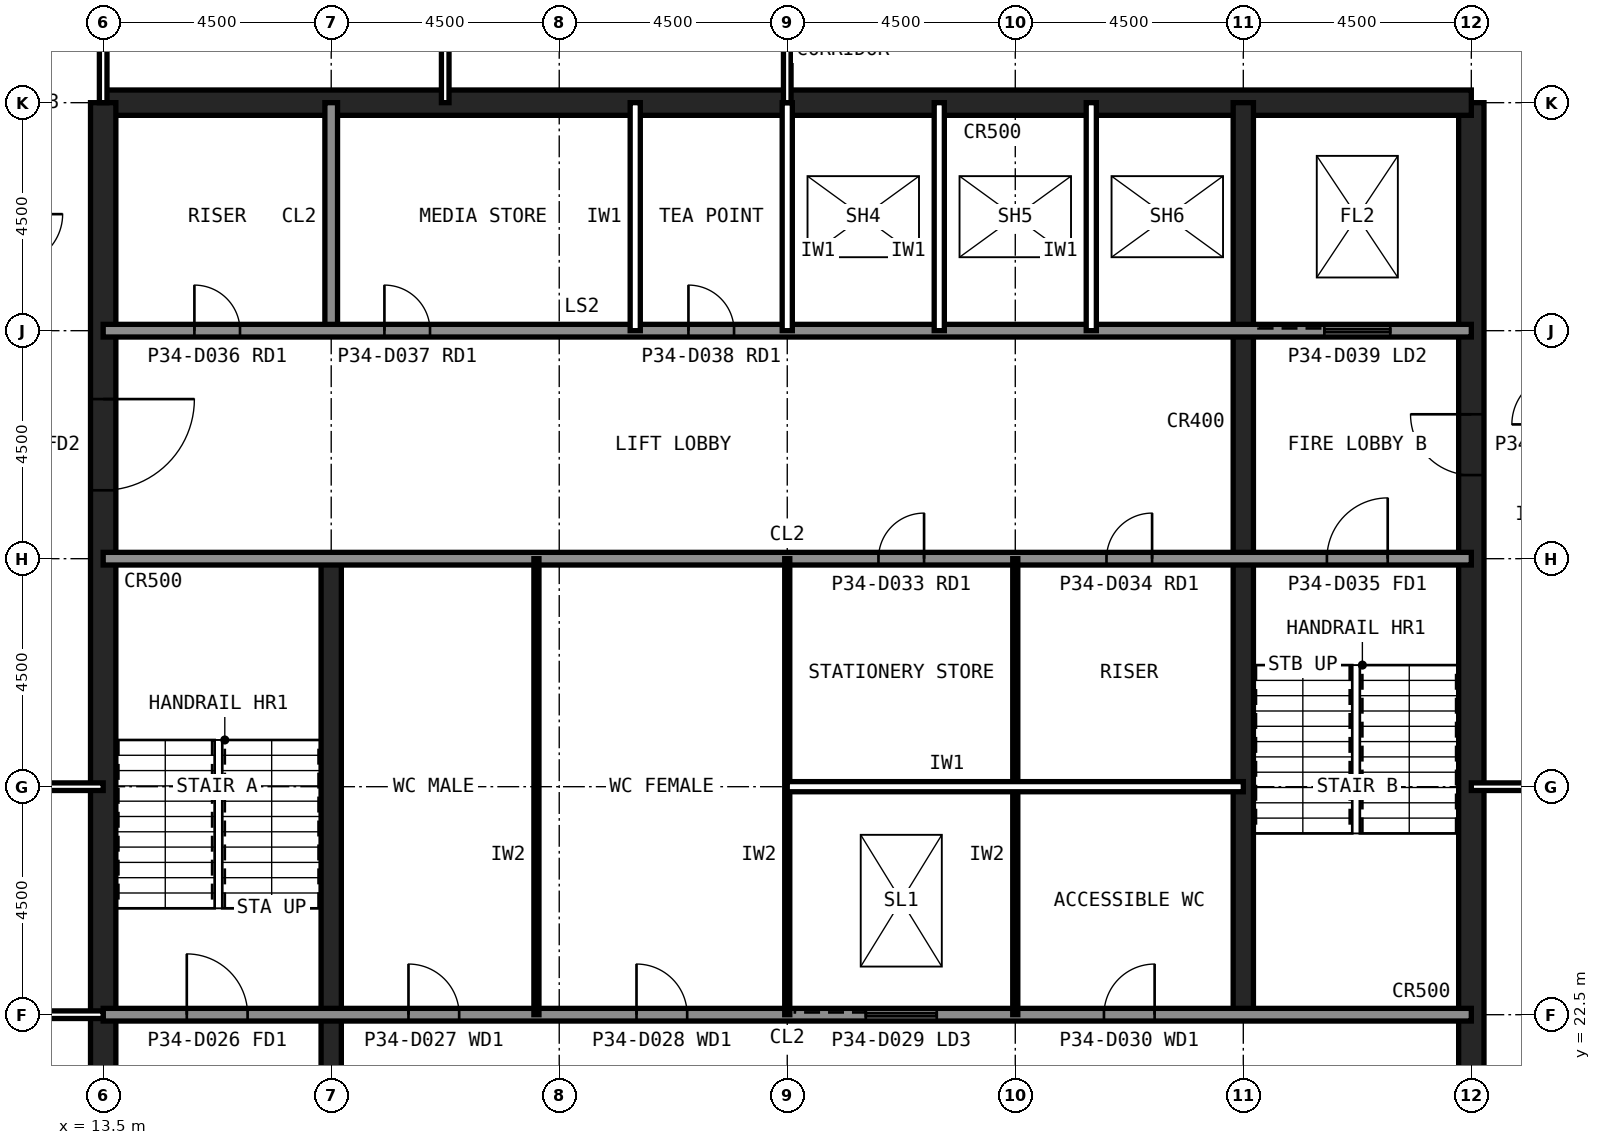
"""IFC4 building model, lengths in metres.
Left out: names, types, materials, properties, quantities, classifications, styles, units other than length and angle.
Written with IfcOpenShell. Run it as: python <this file> out.ifc"""

import sys

from ifc_helpers import new_model, si_unit, direction, frame, frame_2d, origin, place, context, subcontext, project, spatial, rectangle, extrude, element, fill, save


model = new_model("IFC4")
c1 = context("Model", 3, precision=1e-05, world=origin(), true_north=direction((0.0, 1.0)))
c2 = subcontext(c1, "Body", "Model", "MODEL_VIEW")
j1 = project(units=[si_unit("LENGTHUNIT", "METRE"), si_unit("PLANEANGLEUNIT", "RADIAN")], contexts=[c1])
p1 = place(None, origin())
s1 = spatial("IfcSite", under=j1, at=p1, CompositionType="ELEMENT")
p2 = place(p1, origin())
s2 = spatial("IfcBuilding", under=s1, at=p2, CompositionType="ELEMENT")
p3 = place(p2, frame((0.0, 0.0, 143.6)))
s3 = spatial("IfcBuildingStorey", under=s2, at=p3, CompositionType="ELEMENT", Elevation=143.6)
p4 = place(p3, frame((40.5, 13.5, 0.0), z_axis=(0.0, 0.0, 1.0), x_axis=(0.0, 1.0, 0.0)))
e1 = element("IfcWall", 1, at=p4, inside=s3, PredefinedType="SHEAR", context=c2, shape_type="SweptSolid", body=[
    extrude(rectangle(XDim=27.0, YDim=0.5, at=frame_2d((13.5, 0.0))), origin(), (0.0, 0.0, 1.0), 4.0),
])
p5 = place(p4, frame((5.85, 0.0, 0.0)))
e2 = element("IfcOpeningElement", 2, at=p5, cuts=e1, PredefinedType="OPENING", context=c2, shape_type="SweptSolid", body=[
    extrude(rectangle(XDim=1.8, YDim=2.1, at=frame_2d((0.9, 1.05))), frame((0.0, 0.26, 0.0), z_axis=(0.0, -1.0, 0.0), x_axis=(1.0, 0.0, 0.0)), (0.0, 0.0, 1.0), 0.52),
])
p6 = place(p4, frame((19.65, 0.0, 0.0)))
e3 = element("IfcOpeningElement", 3, at=p6, cuts=e1, PredefinedType="OPENING", context=c2, shape_type="SweptSolid", body=[
    extrude(rectangle(XDim=1.2, YDim=2.1, at=frame_2d((0.6, 1.05))), frame((0.0, 0.26, 0.0), z_axis=(0.0, -1.0, 0.0), x_axis=(1.0, 0.0, 0.0)), (0.0, 0.0, 1.0), 0.52),
])
p7 = place(p3, frame((40.5, 40.5, 0.0), z_axis=(0.0, 0.0, 1.0), x_axis=(-1.0, 0.0, 0.0)))
e4 = element("IfcWall", 4, at=p7, inside=s3, PredefinedType="SHEAR", context=c2, shape_type="SweptSolid", body=[
    extrude(rectangle(XDim=27.0, YDim=0.5, at=frame_2d((13.5, 0.0))), origin(), (0.0, 0.0, 1.0), 4.0),
])
p8 = place(p3, frame((13.5, 40.5, 0.0), z_axis=(0.0, 0.0, 1.0), x_axis=(0.0, -1.0, 0.0)))
e5 = element("IfcWall", 5, at=p8, inside=s3, PredefinedType="SHEAR", context=c2, shape_type="SweptSolid", body=[
    extrude(rectangle(XDim=27.0, YDim=0.5, at=frame_2d((13.5, 0.0))), origin(), (0.0, 0.0, 1.0), 4.0),
])
p9 = place(p8, frame((19.65, 0.0, 0.0)))
e6 = element("IfcOpeningElement", 6, at=p9, cuts=e5, PredefinedType="OPENING", context=c2, shape_type="SweptSolid", body=[
    extrude(rectangle(XDim=1.2, YDim=2.1, at=frame_2d((0.6, 1.05))), frame((0.0, 0.26, 0.0), z_axis=(0.0, -1.0, 0.0), x_axis=(1.0, 0.0, 0.0)), (0.0, 0.0, 1.0), 0.52),
])
p10 = place(p8, frame((5.85, 0.0, 0.0)))
e7 = element("IfcOpeningElement", 7, at=p10, cuts=e5, PredefinedType="OPENING", context=c2, shape_type="SweptSolid", body=[
    extrude(rectangle(XDim=1.8, YDim=2.1, at=frame_2d((0.9, 1.05))), frame((0.0, 0.26, 0.0), z_axis=(0.0, -1.0, 0.0), x_axis=(1.0, 0.0, 0.0)), (0.0, 0.0, 1.0), 0.52),
])
p11 = place(p3, frame((18.0, 13.5, 0.0), z_axis=(0.0, 0.0, 1.0), x_axis=(0.0, 1.0, 0.0)))
e8 = element("IfcWall", 8, at=p11, inside=s3, PredefinedType="SHEAR", context=c2, shape_type="SweptSolid", body=[
    extrude(rectangle(XDim=18.0, YDim=0.4, at=frame_2d((9.0, 0.0))), origin(), (0.0, 0.0, 1.0), 4.0),
])
p12 = place(p3, frame((18.0, 36.0, 0.0), z_axis=(0.0, 0.0, 1.0), x_axis=(0.0, 1.0, 0.0)))
e9 = element("IfcWall", 9, at=p12, inside=s3, PredefinedType="SOLIDWALL", context=c2, shape_type="SweptSolid", body=[
    extrude(rectangle(XDim=4.5, YDim=0.25, at=frame_2d((2.25, 0.0))), origin(), (0.0, 0.0, 1.0), 3.84),
])
p13 = place(p3, frame((36.0, 22.5, 0.0), z_axis=(0.0, 0.0, 1.0), x_axis=(0.0, 1.0, 0.0)))
e10 = element("IfcWall", 10, at=p13, inside=s3, PredefinedType="SHEAR", context=c2, shape_type="SweptSolid", body=[
    extrude(rectangle(XDim=18.0, YDim=0.4, at=frame_2d((9.0, 0.0))), origin(), (0.0, 0.0, 1.0), 4.0),
])
p14 = place(p3, frame((13.5, 36.0, 0.0), z_axis=(0.0, 0.0, 1.0), x_axis=(1.0, 0.0, 0.0)))
e11 = element("IfcWall", 11, at=p14, inside=s3, PredefinedType="SOLIDWALL", context=c2, shape_type="SweptSolid", body=[
    extrude(rectangle(XDim=27.0, YDim=0.25, at=frame_2d((13.5, 0.0))), origin(), (0.0, 0.0, 1.0), 3.84),
])
p15 = place(p14, frame((1.8, 0.0, 0.0)))
e12 = element("IfcOpeningElement", 12, at=p15, cuts=e11, PredefinedType="OPENING", context=c2, shape_type="SweptSolid", body=[
    extrude(rectangle(XDim=0.9, YDim=2.1, at=frame_2d((0.45, 1.05))), frame((0.0, 0.135, 0.0), z_axis=(0.0, -1.0, 0.0), x_axis=(1.0, 0.0, 0.0)), (0.0, 0.0, 1.0), 0.27),
])
p16 = place(p14, frame((5.55, 0.0, 0.0)))
e13 = element("IfcOpeningElement", 13, at=p16, cuts=e11, PredefinedType="OPENING", context=c2, shape_type="SweptSolid", body=[
    extrude(rectangle(XDim=0.9, YDim=2.1, at=frame_2d((0.45, 1.05))), frame((0.0, 0.135, 0.0), z_axis=(0.0, -1.0, 0.0), x_axis=(1.0, 0.0, 0.0)), (0.0, 0.0, 1.0), 0.27),
])
p17 = place(p14, frame((8.55, 0.0, 0.0)))
e14 = element("IfcOpeningElement", 14, at=p17, cuts=e11, PredefinedType="OPENING", context=c2, shape_type="SweptSolid", body=[
    extrude(rectangle(XDim=0.9, YDim=2.1, at=frame_2d((0.45, 1.05))), frame((0.0, 0.135, 0.0), z_axis=(0.0, -1.0, 0.0), x_axis=(1.0, 0.0, 0.0)), (0.0, 0.0, 1.0), 0.27),
])
p18 = place(p14, frame((11.55, 0.0, 0.0)))
e15 = element("IfcOpeningElement", 15, at=p18, cuts=e11, PredefinedType="OPENING", context=c2, shape_type="SweptSolid", body=[
    extrude(rectangle(XDim=0.9, YDim=2.1, at=frame_2d((0.45, 1.05))), frame((0.0, 0.135, 0.0), z_axis=(0.0, -1.0, 0.0), x_axis=(1.0, 0.0, 0.0)), (0.0, 0.0, 1.0), 0.27),
])
p19 = place(p14, frame((24.1, 0.0, 0.0)))
e16 = element("IfcOpeningElement", 16, at=p19, cuts=e11, PredefinedType="OPENING", context=c2, shape_type="SweptSolid", body=[
    extrude(rectangle(XDim=1.3, YDim=2.2, at=frame_2d((0.65, 1.1))), frame((0.0, 0.135, 0.0), z_axis=(0.0, -1.0, 0.0), x_axis=(1.0, 0.0, 0.0)), (0.0, 0.0, 1.0), 0.27),
])
p20 = place(p3, frame((13.5, 22.5, 0.0), z_axis=(0.0, 0.0, 1.0), x_axis=(1.0, 0.0, 0.0)))
e17 = element("IfcWall", 17, at=p20, inside=s3, PredefinedType="SOLIDWALL", context=c2, shape_type="SweptSolid", body=[
    extrude(rectangle(XDim=27.0, YDim=0.25, at=frame_2d((13.5, 0.0))), origin(), (0.0, 0.0, 1.0), 3.84),
])
p21 = place(p20, frame((1.65, 0.0, 0.0)))
e18 = element("IfcOpeningElement", 18, at=p21, cuts=e17, PredefinedType="OPENING", context=c2, shape_type="SweptSolid", body=[
    extrude(rectangle(XDim=1.2, YDim=2.1, at=frame_2d((0.6, 1.05))), frame((0.0, 0.135, 0.0), z_axis=(0.0, -1.0, 0.0), x_axis=(1.0, 0.0, 0.0)), (0.0, 0.0, 1.0), 0.27),
])
p22 = place(p20, frame((6.025, 0.0, 0.0)))
e19 = element("IfcOpeningElement", 19, at=p22, cuts=e17, PredefinedType="OPENING", context=c2, shape_type="SweptSolid", body=[
    extrude(rectangle(XDim=1.0, YDim=2.1, at=frame_2d((0.5, 1.05))), frame((0.0, 0.135, 0.0), z_axis=(0.0, -1.0, 0.0), x_axis=(1.0, 0.0, 0.0)), (0.0, 0.0, 1.0), 0.27),
])
p23 = place(p20, frame((10.525, 0.0, 0.0)))
e20 = element("IfcOpeningElement", 20, at=p23, cuts=e17, PredefinedType="OPENING", context=c2, shape_type="SweptSolid", body=[
    extrude(rectangle(XDim=1.0, YDim=2.1, at=frame_2d((0.5, 1.05))), frame((0.0, 0.135, 0.0), z_axis=(0.0, -1.0, 0.0), x_axis=(1.0, 0.0, 0.0)), (0.0, 0.0, 1.0), 0.27),
])
p24 = place(p20, frame((19.75, 0.0, 0.0)))
e21 = element("IfcOpeningElement", 21, at=p24, cuts=e17, PredefinedType="OPENING", context=c2, shape_type="SweptSolid", body=[
    extrude(rectangle(XDim=1.0, YDim=2.1, at=frame_2d((0.5, 1.05))), frame((0.0, 0.135, 0.0), z_axis=(0.0, -1.0, 0.0), x_axis=(1.0, 0.0, 0.0)), (0.0, 0.0, 1.0), 0.27),
])
p25 = place(p20, frame((15.05, 0.0, 0.0)))
e22 = element("IfcOpeningElement", 22, at=p25, cuts=e17, PredefinedType="OPENING", context=c2, shape_type="SweptSolid", body=[
    extrude(rectangle(XDim=1.4, YDim=2.4, at=frame_2d((0.7, 1.2))), frame((0.0, 0.135, 0.0), z_axis=(0.0, -1.0, 0.0), x_axis=(1.0, 0.0, 0.0)), (0.0, 0.0, 1.0), 0.27),
])
p26 = place(p3, frame((13.5, 31.5, 0.0), z_axis=(0.0, 0.0, 1.0), x_axis=(1.0, 0.0, 0.0)))
e23 = element("IfcWall", 23, at=p26, inside=s3, PredefinedType="SOLIDWALL", context=c2, shape_type="SweptSolid", body=[
    extrude(rectangle(XDim=27.0, YDim=0.25, at=frame_2d((13.5, 0.0))), origin(), (0.0, 0.0, 1.0), 3.84),
])
p27 = place(p26, frame((24.15, 0.0, 0.0)))
e24 = element("IfcOpeningElement", 24, at=p27, cuts=e23, PredefinedType="OPENING", context=c2, shape_type="SweptSolid", body=[
    extrude(rectangle(XDim=1.2, YDim=2.1, at=frame_2d((0.6, 1.05))), frame((0.0, 0.135, 0.0), z_axis=(0.0, -1.0, 0.0), x_axis=(1.0, 0.0, 0.0)), (0.0, 0.0, 1.0), 0.27),
])
p28 = place(p26, frame((15.3, 0.0, 0.0)))
e25 = element("IfcOpeningElement", 25, at=p28, cuts=e23, PredefinedType="OPENING", context=c2, shape_type="SweptSolid", body=[
    extrude(rectangle(XDim=0.9, YDim=2.1, at=frame_2d((0.45, 1.05))), frame((0.0, 0.135, 0.0), z_axis=(0.0, -1.0, 0.0), x_axis=(1.0, 0.0, 0.0)), (0.0, 0.0, 1.0), 0.27),
])
p29 = place(p26, frame((19.8, 0.0, 0.0)))
e26 = element("IfcOpeningElement", 26, at=p29, cuts=e23, PredefinedType="OPENING", context=c2, shape_type="SweptSolid", body=[
    extrude(rectangle(XDim=0.9, YDim=2.1, at=frame_2d((0.45, 1.05))), frame((0.0, 0.135, 0.0), z_axis=(0.0, -1.0, 0.0), x_axis=(1.0, 0.0, 0.0)), (0.0, 0.0, 1.0), 0.27),
])
for number, where, z_axis, x_axis in (
    (27, (21.0, 36.0, 0.0), (0.0, 0.0, 1.0), (0.0, 1.0, 0.0)),
    (28, (24.0, 36.0, 0.0), (0.0, 0.0, 1.0), (0.0, 1.0, 0.0)),
    (29, (27.0, 36.0, 0.0), (0.0, 0.0, 1.0), (0.0, 1.0, 0.0)),
    (30, (30.0, 36.0, 0.0), (0.0, 0.0, 1.0), (0.0, 1.0, 0.0)),
    (31, (33.0, 36.0, 0.0), (0.0, 0.0, 1.0), (0.0, 1.0, 0.0)),
):
    element("IfcWall", number, at=place(p3, frame(where, z_axis=z_axis, x_axis=x_axis)), inside=s3, PredefinedType="PARTITIONING", context=c2, shape_type="SweptSolid", body=[
        extrude(rectangle(XDim=4.5, YDim=0.2, at=frame_2d((2.25, 0.0))), origin(), (0.0, 0.0, 1.0), 3.84),
    ])
for number, where, z_axis, x_axis in (
    (32, (22.05, 22.5, 0.0), (0.0, 0.0, 1.0), (0.0, 1.0, 0.0)),
    (33, (27.0, 22.5, 0.0), (0.0, 0.0, 1.0), (0.0, 1.0, 0.0)),
    (34, (31.5, 22.5, 0.0), (0.0, 0.0, 1.0), (0.0, 1.0, 0.0)),
):
    element("IfcWall", number, at=place(p3, frame(where, z_axis=z_axis, x_axis=x_axis)), inside=s3, PredefinedType="PLUMBINGWALL", context=c2, shape_type="SweptSolid", body=[
        extrude(rectangle(XDim=9.0, YDim=0.1, at=frame_2d((4.5, 0.0))), origin(), (0.0, 0.0, 1.0), 3.84),
    ])
p30 = place(p3, frame((27.0, 27.0, 0.0), z_axis=(0.0, 0.0, 1.0), x_axis=(1.0, 0.0, 0.0)))
e35 = element("IfcWall", 35, at=p30, inside=s3, PredefinedType="PARTITIONING", context=c2, shape_type="SweptSolid", body=[
    extrude(rectangle(XDim=9.0, YDim=0.2, at=frame_2d((4.5, 0.0))), origin(), (0.0, 0.0, 1.0), 3.84),
])
for number, where, z_axis, x_axis in (
    (36, (0.385, 27.0, 0.0), (0.0, 0.0, 1.0), (1.0, 0.0, 0.0)),
    (37, (40.5, 27.0, 0.0), (0.0, 0.0, 1.0), (1.0, 0.0, 0.0)),
):
    element("IfcWall", number, at=place(p3, frame(where, z_axis=z_axis, x_axis=x_axis)), inside=s3, PredefinedType="PARTITIONING", context=c2, shape_type="SweptSolid", body=[
        extrude(rectangle(XDim=13.115, YDim=0.15, at=frame_2d((6.558, 0.0))), origin(), (0.0, 0.0, 1.0), 2.989),
    ])
p31 = place(p3, frame((8.1, 22.5, 0.0), z_axis=(0.0, 0.0, 1.0), x_axis=(1.0, 0.0, 0.0)))
e38 = element("IfcWall", 38, at=p31, inside=s3, PredefinedType="PARTITIONING", context=c2, shape_type="SweptSolid", body=[
    extrude(rectangle(XDim=5.4, YDim=0.15, at=frame_2d((2.7, 0.0))), origin(), (0.0, 0.0, 1.0), 2.989),
])
p32 = place(p31, frame((2.2, 0.0, 0.0)))
e39 = element("IfcOpeningElement", 39, at=p32, cuts=e38, PredefinedType="OPENING", context=c2, shape_type="SweptSolid", body=[
    extrude(rectangle(XDim=1.0, YDim=2.1, at=frame_2d((0.5, 1.05))), frame((0.0, 0.085, 0.0), z_axis=(0.0, -1.0, 0.0), x_axis=(1.0, 0.0, 0.0)), (0.0, 0.0, 1.0), 0.17),
])
p33 = place(p3, frame((20.25, 40.5, 0.0), z_axis=(0.0, 0.0, 1.0), x_axis=(0.0, 1.0, 0.0)))
e40 = element("IfcWall", 40, at=p33, inside=s3, PredefinedType="PARTITIONING", context=c2, shape_type="SweptSolid", body=[
    extrude(rectangle(XDim=4.5, YDim=0.15, at=frame_2d((2.25, 0.0))), origin(), (0.0, 0.0, 1.0), 3.84),
])
p34 = place(p3, frame((13.5, 45.0, 0.0), z_axis=(0.0, 0.0, 1.0), x_axis=(0.0, -1.0, 0.0)))
e41 = element("IfcWall", 41, at=p34, inside=s3, PredefinedType="PARTITIONING", context=c2, shape_type="SweptSolid", body=[
    extrude(rectangle(XDim=4.5, YDim=0.15, at=frame_2d((2.25, 0.0))), origin(), (0.0, 0.0, 1.0), 2.989),
])
p35 = place(p3, frame((27.0, 40.5, 0.0), z_axis=(0.0, 0.0, 1.0), x_axis=(0.0, 1.0, 0.0)))
e42 = element("IfcWall", 42, at=p35, inside=s3, PredefinedType="PARTITIONING", context=c2, shape_type="SweptSolid", body=[
    extrude(rectangle(XDim=4.5, YDim=0.15, at=frame_2d((2.25, 0.0))), origin(), (0.0, 0.0, 1.0), 2.989),
])
p36 = place(p35, frame((1.75, 0.0, 0.0)))
e43 = element("IfcOpeningElement", 43, at=p36, cuts=e42, PredefinedType="OPENING", context=c2, shape_type="SweptSolid", body=[
    extrude(rectangle(XDim=1.0, YDim=2.1, at=frame_2d((0.5, 1.05))), frame((0.0, 0.085, 0.0), z_axis=(0.0, -1.0, 0.0), x_axis=(1.0, 0.0, 0.0)), (0.0, 0.0, 1.0), 0.17),
])
p37 = place(p10, origin())
e44 = element("IfcDoor", 44, at=p37, inside=s3, OperationType="SINGLE_SWING_LEFT", PredefinedType="DOOR", context=c2, shape_type="SweptSolid", body=[
    extrude(rectangle(XDim=1.8, YDim=2.1, at=frame_2d((0.9, 1.05))), frame((0.0, 0.025, 0.0), z_axis=(0.0, -1.0, 0.0), x_axis=(1.0, 0.0, 0.0)), (0.0, 0.0, 1.0), 0.05),
])
fill(e7, e44)
p38 = place(p6, origin())
e45 = element("IfcDoor", 45, at=p38, inside=s3, OperationType="SINGLE_SWING_RIGHT", PredefinedType="DOOR", context=c2, shape_type="SweptSolid", body=[
    extrude(rectangle(XDim=1.2, YDim=2.1, at=frame_2d((0.6, 1.05))), frame((0.0, 0.025, 0.0), z_axis=(0.0, -1.0, 0.0), x_axis=(1.0, 0.0, 0.0)), (0.0, 0.0, 1.0), 0.05),
])
fill(e3, e45)
p39 = place(p21, origin())
e46 = element("IfcDoor", 46, at=p39, inside=s3, OperationType="SINGLE_SWING_LEFT", PredefinedType="DOOR", context=c2, shape_type="SweptSolid", body=[
    extrude(rectangle(XDim=1.2, YDim=2.1, at=frame_2d((0.6, 1.05))), frame((0.0, 0.025, 0.0), z_axis=(0.0, -1.0, 0.0), x_axis=(1.0, 0.0, 0.0)), (0.0, 0.0, 1.0), 0.05),
])
fill(e18, e46)
p40 = place(p27, origin())
e47 = element("IfcDoor", 47, at=p40, inside=s3, OperationType="SINGLE_SWING_RIGHT", PredefinedType="DOOR", context=c2, shape_type="SweptSolid", body=[
    extrude(rectangle(XDim=1.2, YDim=2.1, at=frame_2d((0.6, 1.05))), frame((0.0, 0.025, 0.0), z_axis=(0.0, -1.0, 0.0), x_axis=(1.0, 0.0, 0.0)), (0.0, 0.0, 1.0), 0.05),
])
fill(e24, e47)
p41 = place(p22, origin())
e48 = element("IfcDoor", 48, at=p41, inside=s3, OperationType="SINGLE_SWING_LEFT", PredefinedType="DOOR", context=c2, shape_type="SweptSolid", body=[
    extrude(rectangle(XDim=1.0, YDim=2.1, at=frame_2d((0.5, 1.05))), frame((0.0, 0.025, 0.0), z_axis=(0.0, -1.0, 0.0), x_axis=(1.0, 0.0, 0.0)), (0.0, 0.0, 1.0), 0.05),
])
fill(e19, e48)
p42 = place(p23, origin())
e49 = element("IfcDoor", 49, at=p42, inside=s3, OperationType="SINGLE_SWING_LEFT", PredefinedType="DOOR", context=c2, shape_type="SweptSolid", body=[
    extrude(rectangle(XDim=1.0, YDim=2.1, at=frame_2d((0.5, 1.05))), frame((0.0, 0.025, 0.0), z_axis=(0.0, -1.0, 0.0), x_axis=(1.0, 0.0, 0.0)), (0.0, 0.0, 1.0), 0.05),
])
fill(e20, e49)
p43 = place(p24, origin())
e50 = element("IfcDoor", 50, at=p43, inside=s3, OperationType="SINGLE_SWING_RIGHT", PredefinedType="DOOR", context=c2, shape_type="SweptSolid", body=[
    extrude(rectangle(XDim=1.0, YDim=2.1, at=frame_2d((0.5, 1.05))), frame((0.0, 0.025, 0.0), z_axis=(0.0, -1.0, 0.0), x_axis=(1.0, 0.0, 0.0)), (0.0, 0.0, 1.0), 0.05),
])
fill(e21, e50)
p44 = place(p28, origin())
e51 = element("IfcDoor", 51, at=p44, inside=s3, OperationType="SINGLE_SWING_RIGHT", PredefinedType="DOOR", context=c2, shape_type="SweptSolid", body=[
    extrude(rectangle(XDim=0.9, YDim=2.1, at=frame_2d((0.45, 1.05))), frame((0.0, 0.025, 0.0), z_axis=(0.0, -1.0, 0.0), x_axis=(1.0, 0.0, 0.0)), (0.0, 0.0, 1.0), 0.05),
])
fill(e25, e51)
p45 = place(p29, origin())
e52 = element("IfcDoor", 52, at=p45, inside=s3, OperationType="SINGLE_SWING_RIGHT", PredefinedType="DOOR", context=c2, shape_type="SweptSolid", body=[
    extrude(rectangle(XDim=0.9, YDim=2.1, at=frame_2d((0.45, 1.05))), frame((0.0, 0.025, 0.0), z_axis=(0.0, -1.0, 0.0), x_axis=(1.0, 0.0, 0.0)), (0.0, 0.0, 1.0), 0.05),
])
fill(e26, e52)
p46 = place(p15, origin())
e53 = element("IfcDoor", 53, at=p46, inside=s3, OperationType="SINGLE_SWING_LEFT", PredefinedType="DOOR", context=c2, shape_type="SweptSolid", body=[
    extrude(rectangle(XDim=0.9, YDim=2.1, at=frame_2d((0.45, 1.05))), frame((0.0, 0.025, 0.0), z_axis=(0.0, -1.0, 0.0), x_axis=(1.0, 0.0, 0.0)), (0.0, 0.0, 1.0), 0.05),
])
fill(e12, e53)
p47 = place(p16, origin())
e54 = element("IfcDoor", 54, at=p47, inside=s3, OperationType="SINGLE_SWING_LEFT", PredefinedType="DOOR", context=c2, shape_type="SweptSolid", body=[
    extrude(rectangle(XDim=0.9, YDim=2.1, at=frame_2d((0.45, 1.05))), frame((0.0, 0.025, 0.0), z_axis=(0.0, -1.0, 0.0), x_axis=(1.0, 0.0, 0.0)), (0.0, 0.0, 1.0), 0.05),
])
fill(e13, e54)
p48 = place(p17, origin())
e55 = element("IfcDoor", 55, at=p48, inside=s3, OperationType="SINGLE_SWING_LEFT", PredefinedType="DOOR", context=c2, shape_type="SweptSolid", body=[
    extrude(rectangle(XDim=0.9, YDim=2.1, at=frame_2d((0.45, 1.05))), frame((0.0, 0.025, 0.0), z_axis=(0.0, -1.0, 0.0), x_axis=(1.0, 0.0, 0.0)), (0.0, 0.0, 1.0), 0.05),
])
fill(e14, e55)
p49 = place(p18, origin())
e56 = element("IfcDoor", 56, at=p49, inside=s3, OperationType="SINGLE_SWING_LEFT", PredefinedType="DOOR", context=c2, shape_type="SweptSolid", body=[
    extrude(rectangle(XDim=0.9, YDim=2.1, at=frame_2d((0.45, 1.05))), frame((0.0, 0.025, 0.0), z_axis=(0.0, -1.0, 0.0), x_axis=(1.0, 0.0, 0.0)), (0.0, 0.0, 1.0), 0.05),
])
fill(e15, e56)
p50 = place(p19, origin())
e57 = element("IfcDoor", 57, at=p50, inside=s3, OperationType="SLIDING_TO_LEFT", PredefinedType="DOOR", context=c2, shape_type="SweptSolid", body=[
    extrude(rectangle(XDim=1.3, YDim=2.2, at=frame_2d((0.65, 1.1))), frame((0.0, 0.025, 0.0), z_axis=(0.0, -1.0, 0.0), x_axis=(1.0, 0.0, 0.0)), (0.0, 0.0, 1.0), 0.05),
])
fill(e16, e57)
p51 = place(p25, origin())
e58 = element("IfcDoor", 58, at=p51, inside=s3, OperationType="SLIDING_TO_LEFT", PredefinedType="DOOR", context=c2, shape_type="SweptSolid", body=[
    extrude(rectangle(XDim=1.4, YDim=2.4, at=frame_2d((0.7, 1.2))), frame((0.0, 0.025, 0.0), z_axis=(0.0, -1.0, 0.0), x_axis=(1.0, 0.0, 0.0)), (0.0, 0.0, 1.0), 0.05),
])
fill(e22, e58)
save(model, sys.argv[1])
